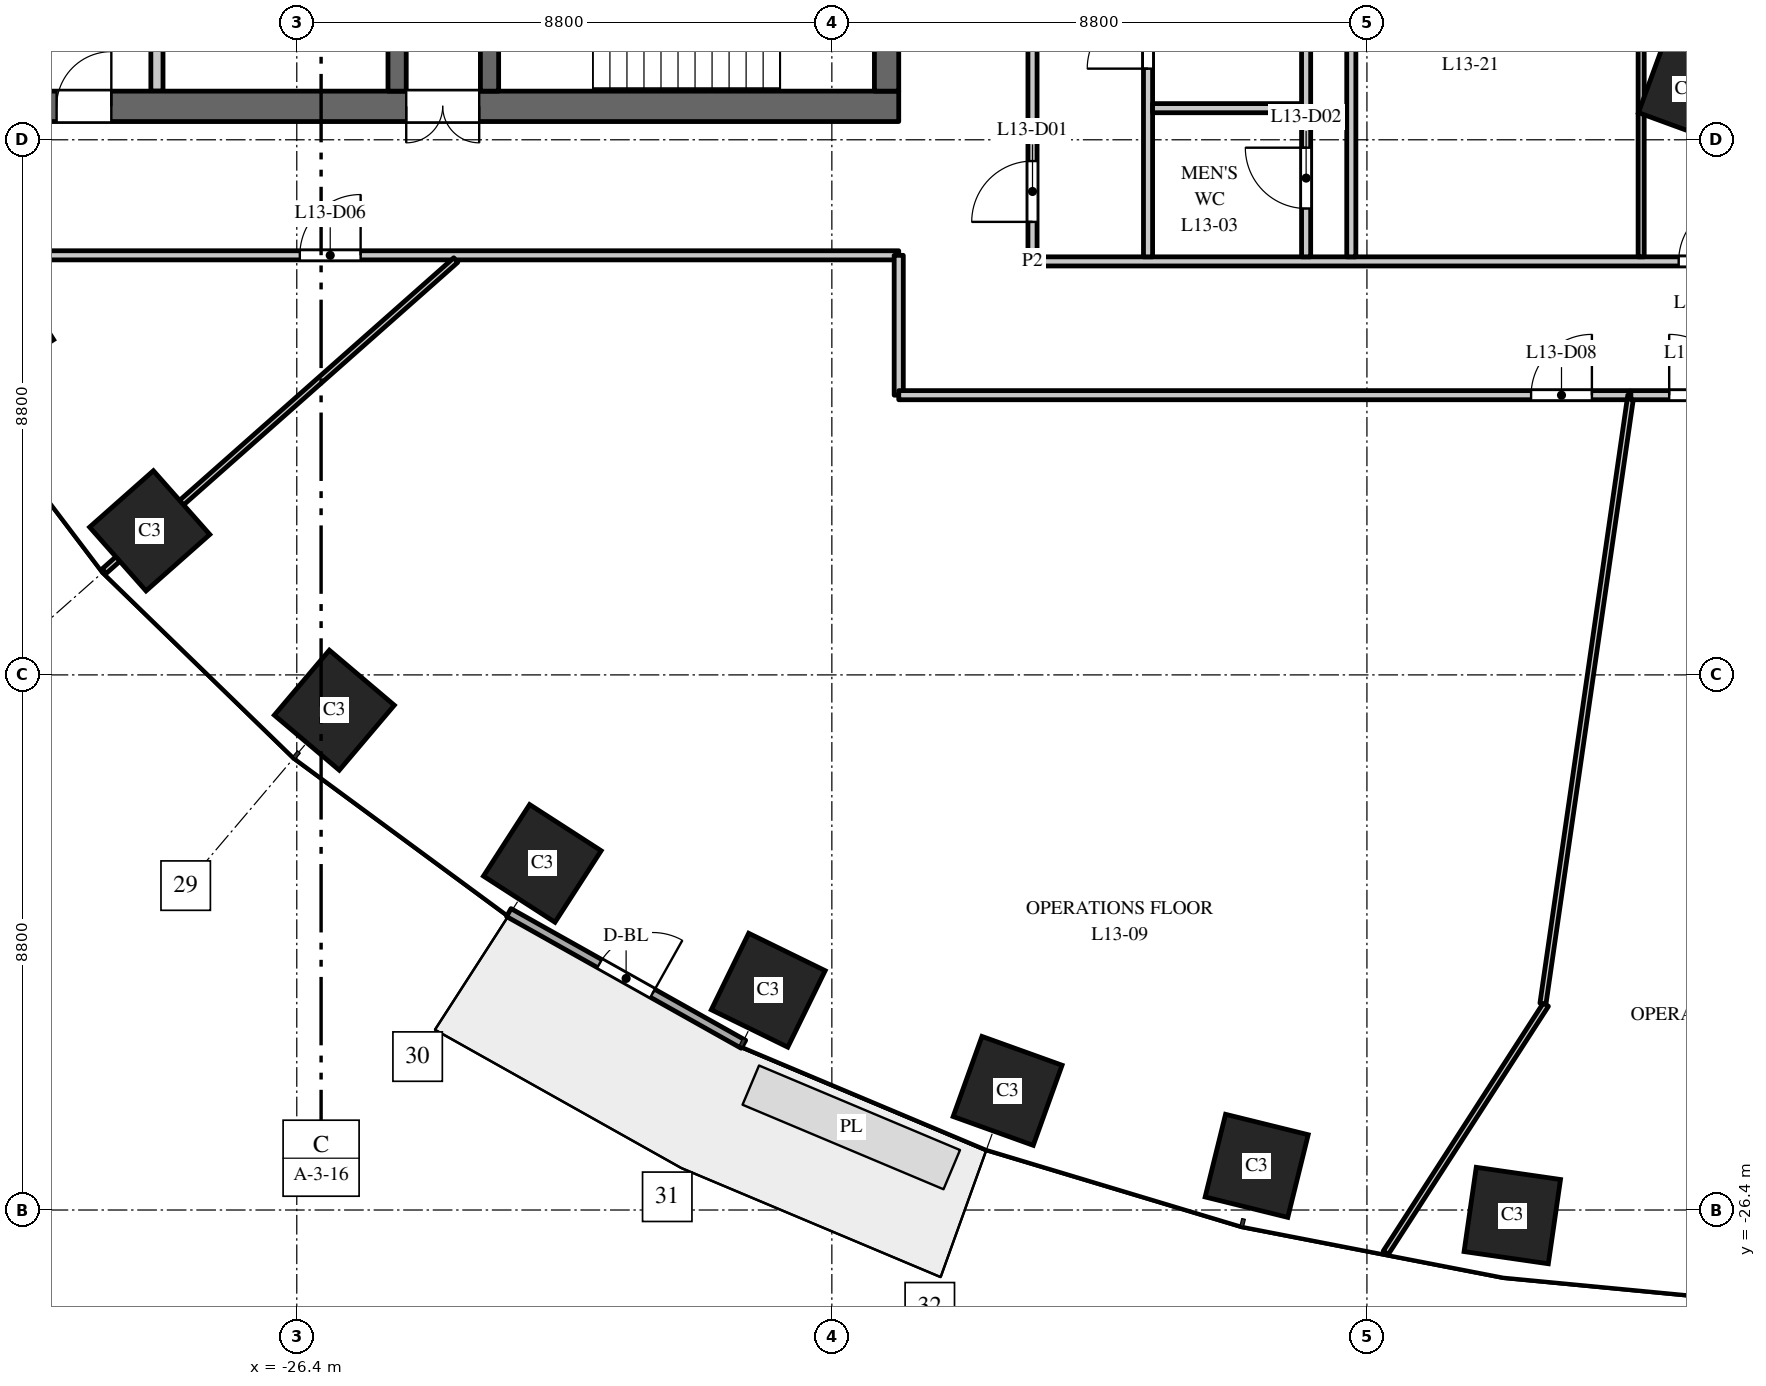
"""IFC4 building model, lengths in metres.
Left out: names, types, materials, properties, quantities, classifications, styles, units other than length and angle.
Written with IfcOpenShell. Run it as: python <this file> out.ifc"""

import sys

from ifc_helpers import new_model, si_unit, direction, frame, frame_2d, origin, origin_2d, place, context, subcontext, project, spatial, rectangle, extrude, element, fill, save


model = new_model("IFC4")
c1 = context("Model", 3, precision=1e-05, world=origin(), true_north=direction((0.0, 1.0)))
c2 = subcontext(c1, "Body", "Model", "MODEL_VIEW")
j1 = project(units=[si_unit("LENGTHUNIT", "METRE"), si_unit("PLANEANGLEUNIT", "RADIAN")], contexts=[c1])
p1 = place(None, origin())
s1 = spatial("IfcSite", under=j1, at=p1, CompositionType="ELEMENT")
p2 = place(p1, origin())
s2 = spatial("IfcBuilding", under=s1, at=p2, CompositionType="ELEMENT")
p3 = place(p2, frame((0.0, 0.0, 62.5)))
s3 = spatial("IfcBuildingStorey", under=s2, at=p3, CompositionType="ELEMENT", Elevation=62.5)
for number, where, z_axis, x_axis in (
    (1, (-31.365, -11.871, 0.0), (0.0, 0.0, 1.0), (0.535, -0.845, 0.0)),
    (2, (-28.819, -15.23, 0.0), (0.0, 0.0, 1.0), (0.663, -0.749, 0.0)),
    (3, (-25.783, -18.18, 0.0), (0.0, 0.0, 1.0), (0.763, -0.646, 0.0)),
    (4, (-22.362, -20.7, 0.0), (0.0, 0.0, 1.0), (0.84, -0.542, 0.0)),
    (5, (-18.646, -22.785, 0.0), (0.0, 0.0, 1.0), (0.898, -0.439, 0.0)),
    (6, (-14.709, -24.441, 0.0), (0.0, 0.0, 1.0), (0.941, -0.338, 0.0)),
    (7, (-10.613, -25.674, 0.0), (0.0, 0.0, 1.0), (0.971, -0.24, 0.0)),
    (8, (-6.409, -26.491, 0.0), (0.0, 0.0, 1.0), (0.99, -0.143, 0.0)),
):
    element("IfcColumn", number, at=place(p3, frame(where, z_axis=z_axis, x_axis=x_axis)), inside=s3, PredefinedType="COLUMN", context=c2, shape_type="SweptSolid", body=[
        extrude(rectangle(XDim=1.4, YDim=1.4, at=origin_2d()), origin(), (0.0, 0.0, 1.0), 4.0),
    ])
p4 = place(p3, frame((-3.501, -7.967, 0.0), z_axis=(0.0, 0.0, 1.0), x_axis=(0.939019578916, -0.343863679984, 0.0)))
e9 = element("IfcColumn", 9, at=p4, inside=s3, PredefinedType="COLUMN", context=c2, shape_type="SweptSolid", body=[
    extrude(rectangle(XDim=1.3, YDim=1.3, at=origin_2d()), origin(), (0.0, 0.0, 1.0), 4.0),
])
p5 = place(p3, frame((-16.5, -8.25, 0.0), z_axis=(0.0, 0.0, 1.0), x_axis=(-1.0, 0.0, 0.0)))
e10 = element("IfcWall", 10, at=p5, inside=s3, PredefinedType="SHEAR", context=c2, shape_type="SweptSolid", body=[
    extrude(rectangle(XDim=15.0, YDim=0.5, at=frame_2d((7.5, 0.0))), origin(), (0.0, 0.0, 1.0), 3.7),
])
p6 = place(p5, frame((6.9, 0.0, 0.0)))
e11 = element("IfcOpeningElement", 11, at=p6, cuts=e10, PredefinedType="OPENING", context=c2, shape_type="SweptSolid", body=[
    extrude(rectangle(XDim=1.2, YDim=2.1, at=frame_2d((0.6, 1.05))), frame((0.0, 0.26, 0.0), z_axis=(0.0, -1.0, 0.0), x_axis=(1.0, 0.0, 0.0)), (0.0, 0.0, 1.0), 0.52),
])
p7 = place(p5, frame((12.95, 0.0, 0.0)))
e12 = element("IfcOpeningElement", 12, at=p7, cuts=e10, PredefinedType="OPENING", context=c2, shape_type="SweptSolid", body=[
    extrude(rectangle(XDim=0.9, YDim=2.1, at=frame_2d((0.45, 1.05))), frame((0.0, 0.26, 0.0), z_axis=(0.0, -1.0, 0.0), x_axis=(1.0, 0.0, 0.0)), (0.0, 0.0, 1.0), 0.52),
])
p8 = place(p3, frame((-24.75, -8.0, 0.0), z_axis=(0.0, 0.0, 1.0), x_axis=(0.0, 1.0, 0.0)))
e13 = element("IfcWall", 13, at=p8, inside=s3, PredefinedType="SHEAR", context=c2, shape_type="SweptSolid", body=[
    extrude(rectangle(XDim=16.0, YDim=0.3, at=frame_2d((8.0, 0.0))), origin(), (0.0, 0.0, 1.0), 3.7),
])
p9 = place(p8, frame((4.425, 0.0, 0.0)))
e14 = element("IfcOpeningElement", 14, at=p9, cuts=e13, PredefinedType="OPENING", context=c2, shape_type="SweptSolid", body=[
    extrude(rectangle(XDim=1.1, YDim=2.1, at=frame_2d((0.55, 1.05))), frame((0.0, 0.16, 0.0), z_axis=(0.0, -1.0, 0.0), x_axis=(1.0, 0.0, 0.0)), (0.0, 0.0, 1.0), 0.32),
])
p10 = place(p8, frame((7.45, 0.0, 0.0)))
e15 = element("IfcOpeningElement", 15, at=p10, cuts=e13, PredefinedType="OPENING", context=c2, shape_type="SweptSolid", body=[
    extrude(rectangle(XDim=1.1, YDim=2.1, at=frame_2d((0.55, 1.05))), frame((0.0, 0.16, 0.0), z_axis=(0.0, -1.0, 0.0), x_axis=(1.0, 0.0, 0.0)), (0.0, 0.0, 1.0), 0.32),
])
p11 = place(p8, frame((10.425, 0.0, 0.0)))
e16 = element("IfcOpeningElement", 16, at=p11, cuts=e13, PredefinedType="OPENING", context=c2, shape_type="SweptSolid", body=[
    extrude(rectangle(XDim=1.2, YDim=2.1, at=frame_2d((0.6, 1.05))), frame((0.0, 0.16, 0.0), z_axis=(0.0, -1.0, 0.0), x_axis=(1.0, 0.0, 0.0)), (0.0, 0.0, 1.0), 0.32),
])
p12 = place(p8, frame((13.75, 0.0, 0.0)))
e17 = element("IfcOpeningElement", 17, at=p12, cuts=e13, PredefinedType="OPENING", context=c2, shape_type="SweptSolid", body=[
    extrude(rectangle(XDim=0.9, YDim=2.1, at=frame_2d((0.45, 1.05))), frame((0.0, 0.16, 0.0), z_axis=(0.0, -1.0, 0.0), x_axis=(1.0, 0.0, 0.0)), (0.0, 0.0, 1.0), 0.32),
])
p13 = place(p8, frame((1.35, 0.0, 0.0)))
e18 = element("IfcOpeningElement", 18, at=p13, cuts=e13, PredefinedType="OPENING", context=c2, shape_type="SweptSolid", body=[
    extrude(rectangle(XDim=0.9, YDim=2.1, at=frame_2d((0.45, 1.05))), frame((0.0, 0.16, 0.0), z_axis=(0.0, -1.0, 0.0), x_axis=(1.0, 0.0, 0.0)), (0.0, 0.0, 1.0), 0.32),
])
p14 = place(p3, frame((-16.7, -8.0, 0.0), z_axis=(0.0, 0.0, 1.0), x_axis=(0.0, 1.0, 0.0)))
e19 = element("IfcWall", 19, at=p14, inside=s3, PredefinedType="SHEAR", context=c2, shape_type="SweptSolid", body=[
    extrude(rectangle(XDim=16.0, YDim=0.4, at=frame_2d((8.0, 0.0))), origin(), (0.0, 0.0, 1.0), 3.7),
])
p15 = place(p3, frame((-28.7, -8.0, 0.0), z_axis=(0.0, 0.0, 1.0), x_axis=(0.0, 1.0, 0.0)))
e20 = element("IfcWall", 20, at=p15, inside=s3, PredefinedType="PARTITIONING", context=c2, shape_type="SweptSolid", body=[
    extrude(rectangle(XDim=3.25, YDim=0.2, at=frame_2d((1.625, 0.0))), origin(), (0.0, 0.0, 1.0), 3.7),
])
p16 = place(p3, frame((-23.23, -8.0, 0.0), z_axis=(0.0, 0.0, 1.0), x_axis=(0.0, 1.0, 0.0)))
e21 = element("IfcWall", 21, at=p16, inside=s3, PredefinedType="SHEAR", context=c2, shape_type="SweptSolid", body=[
    extrude(rectangle(XDim=7.875, YDim=0.3, at=frame_2d((3.938, 0.0))), origin(), (0.0, 0.0, 1.0), 3.7),
])
p17 = place(p16, frame((5.15, 0.0, 0.0)))
e22 = element("IfcOpeningElement", 22, at=p17, cuts=e21, PredefinedType="OPENING", context=c2, shape_type="SweptSolid", body=[
    extrude(rectangle(XDim=1.1, YDim=2.1, at=frame_2d((0.55, 1.05))), frame((0.0, 0.16, 0.0), z_axis=(0.0, -1.0, 0.0), x_axis=(1.0, 0.0, 0.0)), (0.0, 0.0, 1.0), 0.32),
])
p18 = place(p3, frame((-22.913, -21.509, 0.0), z_axis=(0.0, 0.0, 1.0), x_axis=(0.872046572975, -0.489422899509, 0.0)))
e23 = element("IfcWall", 23, at=p18, inside=s3, PredefinedType="STANDARD", context=c2, shape_type="SweptSolid", body=[
    extrude(rectangle(XDim=4.426, YDim=0.15, at=frame_2d((2.213, 0.0))), origin(), (0.0, 0.0, 1.0), 3.7),
])
p19 = place(p18, frame((1.713, 0.0, 0.0)))
e24 = element("IfcOpeningElement", 24, at=p19, cuts=e23, PredefinedType="OPENING", context=c2, shape_type="SweptSolid", body=[
    extrude(rectangle(XDim=1.0, YDim=2.4, at=frame_2d((0.5, 1.2))), frame((0.0, 0.085, 0.0), z_axis=(0.0, -1.0, 0.0), x_axis=(1.0, 0.0, 0.0)), (0.0, 0.0, 1.0), 0.17),
])
p20 = place(p3, frame((-31.5, -10.7, 0.0), z_axis=(0.0, 0.0, 1.0), x_axis=(1.0, 0.0, 0.0)))
e25 = element("IfcWall", 25, at=p20, inside=s3, PredefinedType="PARTITIONING", context=c2, shape_type="SweptSolid", body=[
    extrude(rectangle(XDim=15.0, YDim=0.15, at=frame_2d((7.5, 0.0))), origin(), (0.0, 0.0, 1.0), 3.1),
])
p21 = place(p20, frame((5.15, 0.0, 0.0)))
e26 = element("IfcOpeningElement", 26, at=p21, cuts=e25, PredefinedType="OPENING", context=c2, shape_type="SweptSolid", body=[
    extrude(rectangle(XDim=1.0, YDim=2.1, at=frame_2d((0.5, 1.05))), frame((0.0, 0.085, 0.0), z_axis=(0.0, -1.0, 0.0), x_axis=(1.0, 0.0, 0.0)), (0.0, 0.0, 1.0), 0.17),
])
p22 = place(p3, frame((-29.569, -15.895, 0.0), z_axis=(0.0, 0.0, 1.0), x_axis=(0.748985701008, 0.662586160198, 0.0)))
e27 = element("IfcWall", 27, at=p22, inside=s3, PredefinedType="PARTITIONING", context=c2, shape_type="SweptSolid", body=[
    extrude(rectangle(XDim=7.723, YDim=0.1, at=frame_2d((3.861, 0.0))), origin(), (0.0, 0.0, 1.0), 2.85),
])
p23 = place(p3, frame((-16.5, -13.0, 0.0), z_axis=(0.0, 0.0, 1.0), x_axis=(0.0, 1.0, 0.0)))
e28 = element("IfcWall", 28, at=p23, inside=s3, PredefinedType="PARTITIONING", context=c2, shape_type="SweptSolid", body=[
    extrude(rectangle(XDim=2.3, YDim=0.15, at=frame_2d((1.15, 0.0))), origin(), (0.0, 0.0, 1.0), 2.75),
])
p24 = place(p3, frame((-16.5, -13.0, 0.0), z_axis=(0.0, 0.0, 1.0), x_axis=(1.0, 0.0, 0.0)))
e29 = element("IfcWall", 29, at=p24, inside=s3, PredefinedType="PARTITIONING", context=c2, shape_type="SweptSolid", body=[
    extrude(rectangle(XDim=12.021, YDim=0.15, at=frame_2d((6.01, 0.0))), origin(), (0.0, 0.0, 1.0), 2.85),
])
p25 = place(p24, frame((10.4, 0.0, 0.0)))
e30 = element("IfcOpeningElement", 30, at=p25, cuts=e29, PredefinedType="OPENING", context=c2, shape_type="SweptSolid", body=[
    extrude(rectangle(XDim=1.0, YDim=2.1, at=frame_2d((0.5, 1.05))), frame((0.0, 0.085, 0.0), z_axis=(0.0, -1.0, 0.0), x_axis=(1.0, 0.0, 0.0)), (0.0, 0.0, 1.0), 0.17),
])
p26 = place(p3, frame((-14.3, -10.8, 0.0), z_axis=(0.0, 0.0, 1.0), x_axis=(0.0, 1.0, 0.0)))
e31 = element("IfcWall", 31, at=p26, inside=s3, PredefinedType="PARTITIONING", context=c2, shape_type="SweptSolid", body=[
    extrude(rectangle(XDim=21.6, YDim=0.15, at=frame_2d((10.8, 0.0))), origin(), (0.0, 0.0, 1.0), 2.75),
])
p27 = place(p26, frame((0.65, 0.0, 0.0)))
e32 = element("IfcOpeningElement", 32, at=p27, cuts=e31, PredefinedType="OPENING", context=c2, shape_type="SweptSolid", body=[
    extrude(rectangle(XDim=1.0, YDim=2.1, at=frame_2d((0.5, 1.05))), frame((0.0, 0.085, 0.0), z_axis=(0.0, -1.0, 0.0), x_axis=(1.0, 0.0, 0.0)), (0.0, 0.0, 1.0), 0.17),
])
p28 = place(p3, frame((-14.3, -10.8, 0.0), z_axis=(0.0, 0.0, 1.0), x_axis=(1.0, 0.0, 0.0)))
e33 = element("IfcWall", 33, at=p28, inside=s3, PredefinedType="PARTITIONING", context=c2, shape_type="SweptSolid", body=[
    extrude(rectangle(XDim=28.6, YDim=0.15, at=frame_2d((14.3, 0.0))), origin(), (0.0, 0.0, 1.0), 2.85),
])
p29 = place(p28, frame((10.627, 0.0, 0.0)))
e34 = element("IfcOpeningElement", 34, at=p29, cuts=e33, PredefinedType="OPENING", context=c2, shape_type="SweptSolid", body=[
    extrude(rectangle(XDim=1.0, YDim=2.1, at=frame_2d((0.5, 1.05))), frame((0.0, 0.085, 0.0), z_axis=(0.0, -1.0, 0.0), x_axis=(1.0, 0.0, 0.0)), (0.0, 0.0, 1.0), 0.17),
])
p30 = place(p28, frame((15.393, 0.0, 0.0)))
e35 = element("IfcOpeningElement", 35, at=p30, cuts=e33, PredefinedType="OPENING", context=c2, shape_type="SweptSolid", body=[
    extrude(rectangle(XDim=1.0, YDim=2.1, at=frame_2d((0.5, 1.05))), frame((0.0, 0.085, 0.0), z_axis=(0.0, -1.0, 0.0), x_axis=(1.0, 0.0, 0.0)), (0.0, 0.0, 1.0), 0.17),
])
p31 = place(p3, frame((-12.4, -10.725, 0.0), z_axis=(0.0, 0.0, 1.0), x_axis=(0.0, 1.0, 0.0)))
e36 = element("IfcWall", 36, at=p31, inside=s3, PredefinedType="PARTITIONING", context=c2, shape_type="SweptSolid", body=[
    extrude(rectangle(XDim=7.065, YDim=0.15, at=frame_2d((3.533, 0.0))), origin(), (0.0, 0.0, 1.0), 2.75),
])
p32 = place(p31, frame((3.095, 0.0, 0.0)))
e37 = element("IfcOpeningElement", 37, at=p32, cuts=e36, PredefinedType="OPENING", context=c2, shape_type="SweptSolid", body=[
    extrude(rectangle(XDim=1.0, YDim=2.1, at=frame_2d((0.5, 1.05))), frame((0.0, 0.085, 0.0), z_axis=(0.0, -1.0, 0.0), x_axis=(1.0, 0.0, 0.0)), (0.0, 0.0, 1.0), 0.17),
])
p33 = place(p31, frame((5.447, 0.0, 0.0)))
e38 = element("IfcOpeningElement", 38, at=p33, cuts=e36, PredefinedType="OPENING", context=c2, shape_type="SweptSolid", body=[
    extrude(rectangle(XDim=1.0, YDim=2.1, at=frame_2d((0.5, 1.05))), frame((0.0, 0.085, 0.0), z_axis=(0.0, -1.0, 0.0), x_axis=(1.0, 0.0, 0.0)), (0.0, 0.0, 1.0), 0.17),
])
p34 = place(p3, frame((-12.325, -8.28, 0.0), z_axis=(0.0, 0.0, 1.0), x_axis=(1.0, 0.0, 0.0)))
e39 = element("IfcWall", 39, at=p34, inside=s3, PredefinedType="PARTITIONING", context=c2, shape_type="SweptSolid", body=[
    extrude(rectangle(XDim=2.45, YDim=0.15, at=frame_2d((1.225, 0.0))), origin(), (0.0, 0.0, 1.0), 2.75),
])
p35 = place(p3, frame((-9.8, -10.725, 0.0), z_axis=(0.0, 0.0, 1.0), x_axis=(0.0, 1.0, 0.0)))
e40 = element("IfcWall", 40, at=p35, inside=s3, PredefinedType="PARTITIONING", context=c2, shape_type="SweptSolid", body=[
    extrude(rectangle(XDim=7.065, YDim=0.15, at=frame_2d((3.533, 0.0))), origin(), (0.0, 0.0, 1.0), 2.75),
])
p36 = place(p35, frame((0.795, 0.0, 0.0)))
e41 = element("IfcOpeningElement", 41, at=p36, cuts=e40, PredefinedType="OPENING", context=c2, shape_type="SweptSolid", body=[
    extrude(rectangle(XDim=1.0, YDim=2.1, at=frame_2d((0.5, 1.05))), frame((0.0, 0.085, 0.0), z_axis=(0.0, -1.0, 0.0), x_axis=(1.0, 0.0, 0.0)), (0.0, 0.0, 1.0), 0.17),
])
p37 = place(p3, frame((-9.057, -10.725, 0.0), z_axis=(0.0, 0.0, 1.0), x_axis=(0.0, 1.0, 0.0)))
e42 = element("IfcWall", 42, at=p37, inside=s3, PredefinedType="PARTITIONING", context=c2, shape_type="SweptSolid", body=[
    extrude(rectangle(XDim=10.68, YDim=0.15, at=frame_2d((5.34, 0.0))), origin(), (0.0, 0.0, 1.0), 2.75),
])
p38 = place(p37, frame((5.075, 0.0, 0.0)))
e43 = element("IfcOpeningElement", 43, at=p38, cuts=e42, PredefinedType="OPENING", context=c2, shape_type="SweptSolid", body=[
    extrude(rectangle(XDim=1.0, YDim=2.1, at=frame_2d((0.5, 1.05))), frame((0.0, 0.085, 0.0), z_axis=(0.0, -1.0, 0.0), x_axis=(1.0, 0.0, 0.0)), (0.0, 0.0, 1.0), 0.17),
])
p39 = place(p3, frame((-8.491, -27.104, 0.0), z_axis=(0.0, 0.0, 1.0), x_axis=(0.542285995048, 0.840193965448, 0.0)))
e44 = element("IfcWall", 44, at=p39, inside=s3, PredefinedType="PARTITIONING", context=c2, shape_type="SweptSolid", body=[
    extrude(rectangle(XDim=4.857, YDim=0.1, at=frame_2d((2.429, 0.0))), origin(), (0.0, 0.0, 1.0), 2.85),
])
p40 = place(p3, frame((-5.905, -23.005, 0.0), z_axis=(0.0, 0.0, 1.0), x_axis=(0.143007570509, 0.98972159458, 0.0)))
e45 = element("IfcWall", 45, at=p40, inside=s3, PredefinedType="PARTITIONING", context=c2, shape_type="SweptSolid", body=[
    extrude(rectangle(XDim=10.105, YDim=0.1, at=frame_2d((5.052, 0.0))), origin(), (0.0, 0.0, 1.0), 3.7),
])
p41 = place(p3, frame((-4.459, -13.0, 0.0), z_axis=(0.0, 0.0, 1.0), x_axis=(1.0, 0.0, 0.0)))
e46 = element("IfcWall", 46, at=p41, inside=s3, PredefinedType="PARTITIONING", context=c2, shape_type="SweptSolid", body=[
    extrude(rectangle(XDim=3.293, YDim=0.15, at=frame_2d((1.646, 0.0))), origin(), (0.0, 0.0, 1.0), 3.7),
])
p42 = place(p41, frame((0.63, 0.0, 0.0)))
e47 = element("IfcOpeningElement", 47, at=p42, cuts=e46, PredefinedType="OPENING", context=c2, shape_type="SweptSolid", body=[
    extrude(rectangle(XDim=1.0, YDim=2.1, at=frame_2d((0.5, 1.05))), frame((0.0, 0.085, 0.0), z_axis=(0.0, -1.0, 0.0), x_axis=(1.0, 0.0, 0.0)), (0.0, 0.0, 1.0), 0.17),
])
p43 = place(p3, frame((-4.29, -10.725, 0.0), z_axis=(0.0, 0.0, 1.0), x_axis=(0.0, 1.0, 0.0)))
e48 = element("IfcWall", 48, at=p43, inside=s3, PredefinedType="PARTITIONING", context=c2, shape_type="SweptSolid", body=[
    extrude(rectangle(XDim=4.157, YDim=0.1, at=frame_2d((2.079, 0.0))), origin(), (0.0, 0.0, 1.0), 2.85),
])
p44 = place(p6, origin())
e49 = element("IfcDoor", 49, at=p44, inside=s3, OperationType="DOUBLE_DOOR_DOUBLE_SWING", PredefinedType="DOOR", context=c2, shape_type="SweptSolid", body=[
    extrude(rectangle(XDim=1.2, YDim=2.1, at=frame_2d((0.6, 1.05))), frame((0.0, 0.025, 0.0), z_axis=(0.0, -1.0, 0.0), x_axis=(1.0, 0.0, 0.0)), (0.0, 0.0, 1.0), 0.05),
])
fill(e11, e49)
p45 = place(p7, origin())
e50 = element("IfcDoor", 50, at=p45, inside=s3, OperationType="SINGLE_SWING_LEFT", PredefinedType="DOOR", context=c2, shape_type="SweptSolid", body=[
    extrude(rectangle(XDim=0.9, YDim=2.1, at=frame_2d((0.45, 1.05))), frame((0.0, 0.025, 0.0), z_axis=(0.0, -1.0, 0.0), x_axis=(1.0, 0.0, 0.0)), (0.0, 0.0, 1.0), 0.05),
])
fill(e12, e50)
p46 = place(p19, origin())
e51 = element("IfcDoor", 51, at=p46, inside=s3, OperationType="SINGLE_SWING_RIGHT", PredefinedType="DOOR", context=c2, shape_type="SweptSolid", body=[
    extrude(rectangle(XDim=1.0, YDim=2.4, at=frame_2d((0.5, 1.2))), frame((0.0, 0.025, 0.0), z_axis=(0.0, -1.0, 0.0), x_axis=(1.0, 0.0, 0.0)), (0.0, 0.0, 1.0), 0.05),
])
fill(e24, e51)
p47 = place(p27, origin())
e52 = element("IfcDoor", 52, at=p47, inside=s3, OperationType="SINGLE_SWING_LEFT", PredefinedType="DOOR", context=c2, shape_type="SweptSolid", body=[
    extrude(rectangle(XDim=1.0, YDim=2.1, at=frame_2d((0.5, 1.05))), frame((0.0, 0.025, 0.0), z_axis=(0.0, -1.0, 0.0), x_axis=(1.0, 0.0, 0.0)), (0.0, 0.0, 1.0), 0.05),
])
fill(e32, e52)
p48 = place(p36, origin())
e53 = element("IfcDoor", 53, at=p48, inside=s3, OperationType="SINGLE_SWING_RIGHT", PredefinedType="DOOR", context=c2, shape_type="SweptSolid", body=[
    extrude(rectangle(XDim=1.0, YDim=2.1, at=frame_2d((0.5, 1.05))), frame((0.0, 0.025, 0.0), z_axis=(0.0, -1.0, 0.0), x_axis=(1.0, 0.0, 0.0)), (0.0, 0.0, 1.0), 0.05),
])
fill(e41, e53)
p49 = place(p32, origin())
e54 = element("IfcDoor", 54, at=p49, inside=s3, OperationType="SINGLE_SWING_LEFT", PredefinedType="DOOR", context=c2, shape_type="SweptSolid", body=[
    extrude(rectangle(XDim=1.0, YDim=2.1, at=frame_2d((0.5, 1.05))), frame((0.0, 0.025, 0.0), z_axis=(0.0, -1.0, 0.0), x_axis=(1.0, 0.0, 0.0)), (0.0, 0.0, 1.0), 0.05),
])
fill(e37, e54)
p50 = place(p21, origin())
e55 = element("IfcDoor", 55, at=p50, inside=s3, OperationType="SINGLE_SWING_RIGHT", PredefinedType="DOOR", context=c2, shape_type="SweptSolid", body=[
    extrude(rectangle(XDim=1.0, YDim=2.1, at=frame_2d((0.5, 1.05))), frame((0.0, 0.025, 0.0), z_axis=(0.0, -1.0, 0.0), x_axis=(1.0, 0.0, 0.0)), (0.0, 0.0, 1.0), 0.05),
])
fill(e26, e55)
p51 = place(p25, origin())
e56 = element("IfcDoor", 56, at=p51, inside=s3, OperationType="SINGLE_SWING_RIGHT", PredefinedType="DOOR", context=c2, shape_type="SweptSolid", body=[
    extrude(rectangle(XDim=1.0, YDim=2.1, at=frame_2d((0.5, 1.05))), frame((0.0, 0.025, 0.0), z_axis=(0.0, -1.0, 0.0), x_axis=(1.0, 0.0, 0.0)), (0.0, 0.0, 1.0), 0.05),
])
fill(e30, e56)
p52 = place(p42, origin())
e57 = element("IfcDoor", 57, at=p52, inside=s3, OperationType="SINGLE_SWING_LEFT", PredefinedType="DOOR", context=c2, shape_type="SweptSolid", body=[
    extrude(rectangle(XDim=1.0, YDim=2.1, at=frame_2d((0.5, 1.05))), frame((0.0, 0.025, 0.0), z_axis=(0.0, -1.0, 0.0), x_axis=(1.0, 0.0, 0.0)), (0.0, 0.0, 1.0), 0.05),
])
fill(e47, e57)
p53 = place(p29, origin())
e58 = element("IfcDoor", 58, at=p53, inside=s3, OperationType="SINGLE_SWING_RIGHT", PredefinedType="DOOR", context=c2, shape_type="SweptSolid", body=[
    extrude(rectangle(XDim=1.0, YDim=2.1, at=frame_2d((0.5, 1.05))), frame((0.0, 0.025, 0.0), z_axis=(0.0, -1.0, 0.0), x_axis=(1.0, 0.0, 0.0)), (0.0, 0.0, 1.0), 0.05),
])
fill(e34, e58)
save(model, sys.argv[1])
